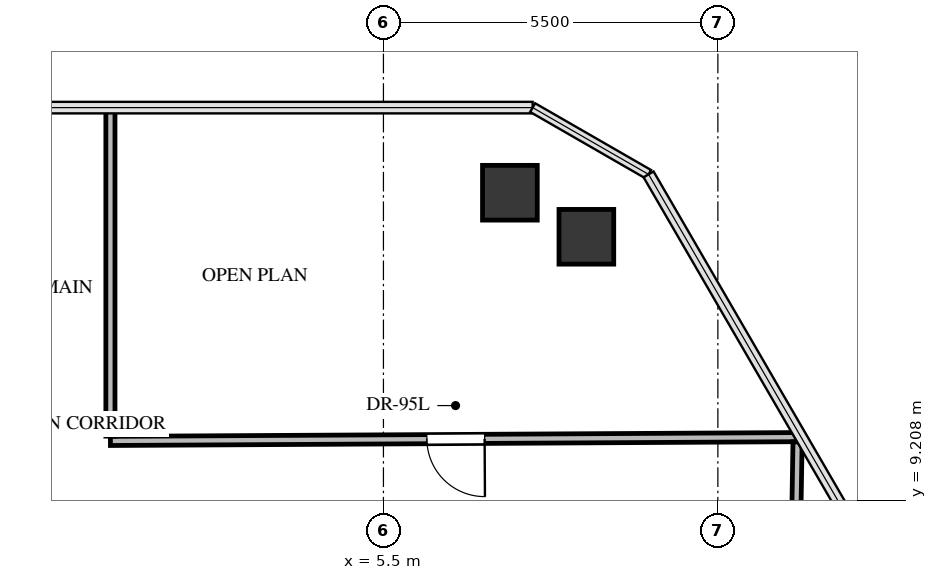
"""IFC4 building model, lengths in metres.
Left out: names, types, materials, properties, quantities, classifications, styles, units other than length and angle.
Written with IfcOpenShell. Run it as: python <this file> out.ifc"""

import sys

from ifc_helpers import new_model, si_unit, direction, frame, frame_2d, origin, origin_2d, place, context, subcontext, project, spatial, rectangle, extrude, source, transform, mapped, element, fill, save


model = new_model("IFC4")
c1 = context("Model", 3, precision=1e-05, world=origin(), true_north=direction((0.0, 1.0)))
c2 = subcontext(c1, "Body", "Model", "MODEL_VIEW")
j1 = project(units=[si_unit("LENGTHUNIT", "METRE"), si_unit("PLANEANGLEUNIT", "RADIAN")], contexts=[c1])
p1 = place(None, origin())
s1 = spatial("IfcSite", under=j1, at=p1, CompositionType="ELEMENT")
p2 = place(p1, origin())
s2 = spatial("IfcBuilding", under=s1, at=p2, CompositionType="ELEMENT")
p3 = place(p2, frame((0.0, 0.0, 248.0)))
s3 = spatial("IfcBuildingStorey", under=s2, at=p3, CompositionType="ELEMENT", Elevation=248.0)
m1 = source(origin(), c2, "Body", "SweptSolid", [
    extrude(rectangle(XDim=0.9, YDim=0.9, at=origin_2d()), origin(), (0.0, 0.0, 1.0), 3.3),
])
for number, where, z_axis, x_axis in (
    (1, (7.58, 14.262, -0.24), (0.0, 0.0, 1.0), (1.0, 0.0, 0.0)),
    (2, (8.837, 13.538, -0.24), (0.0, 0.0, 1.0), (1.0, 0.0, 0.0)),
):
    element("IfcColumn", number, at=place(p3, frame(where, z_axis=z_axis, x_axis=x_axis)), inside=s3, PredefinedType="COLUMN", context=c2, shape_type="MappedRepresentation", body=[
        mapped(m1, transform((0.0, 0.0, 0.0), x_axis=(1.0, 0.0, 0.0), y_axis=(0.0, 1.0, 0.0), z_axis=(0.0, 0.0, 1.0), scale=1.0)),
    ])
p4 = place(p3, frame((12.368, 10.243, 0.0), z_axis=(0.0, 0.0, 1.0), x_axis=(-0.999984623931, -0.005545439622, 0.0)))
e3 = element("IfcWall", 3, at=p4, inside=s3, PredefinedType="PARTITIONING", context=c2, shape_type="SweptSolid", body=[
    extrude(rectangle(XDim=11.359, YDim=0.15, at=frame_2d((5.679, 0.0))), origin(), (0.0, 0.0, 1.0), 2.301),
])
p5 = place(p4, frame((5.204, 0.0, 0.0)))
e4 = element("IfcOpeningElement", 4, at=p5, cuts=e3, PredefinedType="OPENING", context=c2, shape_type="SweptSolid", body=[
    extrude(rectangle(XDim=0.95, YDim=2.1, at=frame_2d((0.475, 1.05))), frame((0.0, 0.085, 0.0), z_axis=(0.0, -1.0, 0.0), x_axis=(1.0, 0.0, 0.0)), (0.0, 0.0, 1.0), 0.17),
])
p6 = place(p3, frame((1.01, 10.259, 0.0), z_axis=(0.0, 0.0, 1.0), x_axis=(0.0, 1.0, 0.0)))
e5 = element("IfcWall", 5, at=p6, inside=s3, PredefinedType="PARTITIONING", context=c2, shape_type="SweptSolid", body=[
    extrude(rectangle(XDim=5.403, YDim=0.15, at=frame_2d((2.702, 0.0))), origin(), (0.0, 0.0, 1.0), 2.399),
])
p7 = place(p3, frame((12.181, 2.49, 0.0), z_axis=(0.0, 0.0, 1.0), x_axis=(0.016828134389, 0.999858396921, 0.0)))
e6 = element("IfcWall", 6, at=p7, inside=s3, PredefinedType="PARTITIONING", context=c2, shape_type="SweptSolid", body=[
    extrude(rectangle(XDim=7.675, YDim=0.15, at=frame_2d((3.837, 0.0))), origin(), (0.0, 0.0, 1.0), 2.399),
])
p8 = place(p7, frame((3.377, 0.0, 0.0)))
e7 = element("IfcOpeningElement", 7, at=p8, cuts=e6, PredefinedType="OPENING", context=c2, shape_type="SweptSolid", body=[
    extrude(rectangle(XDim=0.92, YDim=2.1, at=frame_2d((0.46, 1.05))), frame((0.0, 0.085, 0.0), z_axis=(0.0, -1.0, 0.0), x_axis=(1.0, 0.0, 0.0)), (0.0, 0.0, 1.0), 0.17),
])
m2 = source(origin(), c2, "Body", "SweptSolid", [
    extrude(rectangle(XDim=0.95, YDim=2.1, at=frame_2d((0.475, 1.05))), frame((0.0, 0.025, 0.0), z_axis=(0.0, -1.0, 0.0), x_axis=(1.0, 0.0, 0.0)), (0.0, 0.0, 1.0), 0.05),
])
p9 = place(p5, origin())
e8 = element("IfcDoor", 8, at=p9, inside=s3, OperationType="SINGLE_SWING_LEFT", PredefinedType="DOOR", context=c2, shape_type="MappedRepresentation", body=[
    mapped(m2, transform((0.0, 0.0, 0.0), x_axis=(1.0, 0.0, 0.0), y_axis=(0.0, 1.0, 0.0), z_axis=(0.0, 0.0, 1.0), scale=1.0)),
])
fill(e4, e8)
save(model, sys.argv[1])
